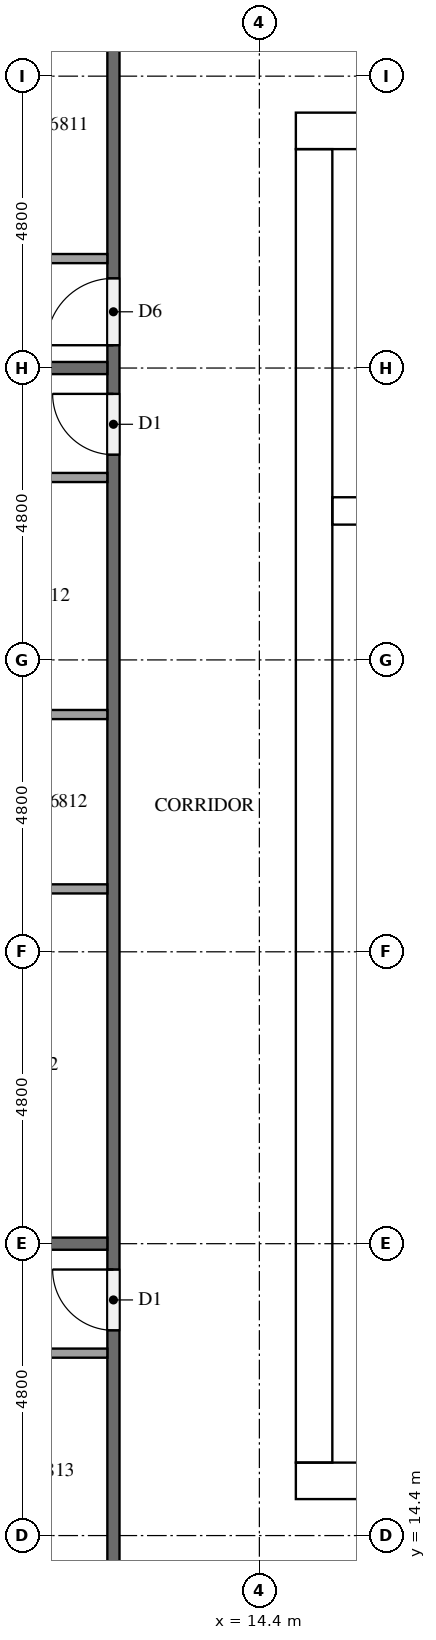
"""IFC4 building model, lengths in metres.
Left out: names, types, materials, properties, quantities, classifications, styles, units other than length and angle.
Written with IfcOpenShell. Run it as: python <this file> out.ifc"""

import sys

from ifc_helpers import new_model, si_unit, direction, frame, frame_2d, origin, place, context, subcontext, project, spatial, rectangle, extrude, element, fill, save


model = new_model("IFC4")
c1 = context("Model", 3, precision=1e-05, world=origin(), true_north=direction((0.0, 1.0)))
c2 = subcontext(c1, "Body", "Model", "MODEL_VIEW")
j1 = project(units=[si_unit("LENGTHUNIT", "METRE"), si_unit("PLANEANGLEUNIT", "RADIAN")], contexts=[c1])
p1 = place(None, origin())
s1 = spatial("IfcSite", under=j1, at=p1, CompositionType="ELEMENT")
p2 = place(p1, origin())
s2 = spatial("IfcBuilding", under=s1, at=p2, CompositionType="ELEMENT")
p3 = place(p2, frame((0.0, 0.0, 259.7)))
s3 = spatial("IfcBuildingStorey", under=s2, at=p3, CompositionType="ELEMENT", Elevation=259.7)
p4 = place(p3, frame((15.0, 15.3, 0.0), z_axis=(0.0, 0.0, 1.0), x_axis=(1.0, 0.0, 0.0)))
e1 = element("IfcWall", 1, at=p4, inside=s3, PredefinedType="SHEAR", context=c2, shape_type="SweptSolid", body=[
    extrude(rectangle(XDim=32.4, YDim=0.6, at=frame_2d((16.2, 0.0))), origin(), (0.0, 0.0, 1.0), 3.1),
])
p5 = place(p4, frame((15.3, 0.0, 0.0)))
e2 = element("IfcOpeningElement", 2, at=p5, cuts=e1, PredefinedType="OPENING", context=c2, shape_type="SweptSolid", body=[
    extrude(rectangle(XDim=1.8, YDim=2.1, at=frame_2d((0.9, 1.05))), frame((0.0, 0.31, 0.0), z_axis=(0.0, -1.0, 0.0), x_axis=(1.0, 0.0, 0.0)), (0.0, 0.0, 1.0), 0.62),
])
p6 = place(p3, frame((15.0, 37.5, 0.0), z_axis=(0.0, 0.0, 1.0), x_axis=(1.0, 0.0, 0.0)))
e3 = element("IfcWall", 3, at=p6, inside=s3, PredefinedType="SHEAR", context=c2, shape_type="SweptSolid", body=[
    extrude(rectangle(XDim=32.4, YDim=0.6, at=frame_2d((16.2, 0.0))), origin(), (0.0, 0.0, 1.0), 3.1),
])
p7 = place(p6, frame((15.3, 0.0, 0.0)))
e4 = element("IfcOpeningElement", 4, at=p7, cuts=e3, PredefinedType="OPENING", context=c2, shape_type="SweptSolid", body=[
    extrude(rectangle(XDim=1.8, YDim=2.1, at=frame_2d((0.9, 1.05))), frame((0.0, 0.31, 0.0), z_axis=(0.0, -1.0, 0.0), x_axis=(1.0, 0.0, 0.0)), (0.0, 0.0, 1.0), 0.62),
])
p8 = place(p6, frame((1.25, 0.0, 0.0)))
e5 = element("IfcOpeningElement", 5, at=p8, cuts=e3, PredefinedType="OPENING", context=c2, shape_type="SweptSolid", body=[
    extrude(rectangle(XDim=1.0, YDim=2.1, at=frame_2d((0.5, 1.05))), frame((0.0, 0.31, 0.0), z_axis=(0.0, -1.0, 0.0), x_axis=(1.0, 0.0, 0.0)), (0.0, 0.0, 1.0), 0.62),
])
p9 = place(p6, frame((4.988, 0.0, 0.0)))
e6 = element("IfcOpeningElement", 6, at=p9, cuts=e3, PredefinedType="OPENING", context=c2, shape_type="SweptSolid", body=[
    extrude(rectangle(XDim=1.0, YDim=2.1, at=frame_2d((0.5, 1.05))), frame((0.0, 0.31, 0.0), z_axis=(0.0, -1.0, 0.0), x_axis=(1.0, 0.0, 0.0)), (0.0, 0.0, 1.0), 0.62),
])
p10 = place(p3, frame((15.3, 15.6, 0.0), z_axis=(0.0, 0.0, 1.0), x_axis=(0.0, 1.0, 0.0)))
e7 = element("IfcWall", 7, at=p10, inside=s3, PredefinedType="SHEAR", context=c2, shape_type="SweptSolid", body=[
    extrude(rectangle(XDim=21.6, YDim=0.6, at=frame_2d((10.8, 0.0))), origin(), (0.0, 0.0, 1.0), 3.1),
])
p11 = place(p10, frame((5.16, 0.0, 0.0)))
e8 = element("IfcOpeningElement", 8, at=p11, cuts=e7, PredefinedType="OPENING", context=c2, shape_type="SweptSolid", body=[
    extrude(rectangle(XDim=1.2, YDim=2.1, at=frame_2d((0.6, 1.05))), frame((0.0, 0.31, 0.0), z_axis=(0.0, -1.0, 0.0), x_axis=(1.0, 0.0, 0.0)), (0.0, 0.0, 1.0), 0.62),
])
p12 = place(p3, frame((15.6, 31.25, 0.0), z_axis=(0.0, 0.0, 1.0), x_axis=(1.0, 0.0, 0.0)))
e9 = element("IfcWall", 9, at=p12, inside=s3, PredefinedType="SHEAR", context=c2, shape_type="SweptSolid", body=[
    extrude(rectangle(XDim=7.275, YDim=0.45, at=frame_2d((3.637, 0.0))), origin(), (0.0, 0.0, 1.0), 3.1),
])
p13 = place(p3, frame((12.0, 12.1, 0.0), z_axis=(0.0, 0.0, 1.0), x_axis=(0.0, 1.0, 0.0)))
e10 = element("IfcWall", 10, at=p13, inside=s3, PredefinedType="PARTITIONING", context=c2, shape_type="SweptSolid", body=[
    extrude(rectangle(XDim=28.6, YDim=0.2, at=frame_2d((14.3, 0.0))), origin(), (0.0, 0.0, 1.0), 3.1),
])
p14 = place(p13, frame((21.875, 0.0, 0.0)))
e11 = element("IfcOpeningElement", 11, at=p14, cuts=e10, PredefinedType="OPENING", context=c2, shape_type="SweptSolid", body=[
    extrude(rectangle(XDim=1.1, YDim=2.1, at=frame_2d((0.55, 1.05))), frame((0.0, 0.11, 0.0), z_axis=(0.0, -1.0, 0.0), x_axis=(1.0, 0.0, 0.0)), (0.0, 0.0, 1.0), 0.22),
])
p15 = place(p13, frame((20.075, 0.0, 0.0)))
e12 = element("IfcOpeningElement", 12, at=p15, cuts=e10, PredefinedType="OPENING", context=c2, shape_type="SweptSolid", body=[
    extrude(rectangle(XDim=1.0, YDim=2.1, at=frame_2d((0.5, 1.05))), frame((0.0, 0.11, 0.0), z_axis=(0.0, -1.0, 0.0), x_axis=(1.0, 0.0, 0.0)), (0.0, 0.0, 1.0), 0.22),
])
p16 = place(p13, frame((5.675, 0.0, 0.0)))
e13 = element("IfcOpeningElement", 13, at=p16, cuts=e10, PredefinedType="OPENING", context=c2, shape_type="SweptSolid", body=[
    extrude(rectangle(XDim=1.0, YDim=2.1, at=frame_2d((0.5, 1.05))), frame((0.0, 0.11, 0.0), z_axis=(0.0, -1.0, 0.0), x_axis=(1.0, 0.0, 0.0)), (0.0, 0.0, 1.0), 0.22),
])
p17 = place(p3, frame((0.1, 33.6, 0.0), z_axis=(0.0, 0.0, 1.0), x_axis=(1.0, 0.0, 0.0)))
e14 = element("IfcWall", 14, at=p17, inside=s3, PredefinedType="PARTITIONING", context=c2, shape_type="SweptSolid", body=[
    extrude(rectangle(XDim=11.8, YDim=0.2, at=frame_2d((5.9, 0.0))), origin(), (0.0, 0.0, 1.0), 3.1),
])
p18 = place(p3, frame((0.275, 19.2, 0.0), z_axis=(0.0, 0.0, 1.0), x_axis=(1.0, 0.0, 0.0)))
e15 = element("IfcWall", 15, at=p18, inside=s3, PredefinedType="PARTITIONING", context=c2, shape_type="SweptSolid", body=[
    extrude(rectangle(XDim=11.625, YDim=0.2, at=frame_2d((5.812, 0.0))), origin(), (0.0, 0.0, 1.0), 3.1),
])
p19 = place(p3, frame((11.9, 35.4, 0.0), z_axis=(0.0, 0.0, 1.0), x_axis=(-1.0, 0.0, 0.0)))
e16 = element("IfcWall", 16, at=p19, inside=s3, PredefinedType="PARTITIONING", context=c2, shape_type="SweptSolid", body=[
    extrude(rectangle(XDim=3.275, YDim=0.15, at=frame_2d((1.637, 0.0))), origin(), (0.0, 0.0, 1.0), 3.1),
])
for number, where, z_axis, x_axis in (
    (17, (11.9, 27.902, 0.0), (0.0, 0.0, 1.0), (-1.0, 0.0, 0.0)),
    (18, (11.9, 25.035, 0.0), (0.0, 0.0, 1.0), (-1.0, 0.0, 0.0)),
):
    element("IfcWall", number, at=place(p3, frame(where, z_axis=z_axis, x_axis=x_axis)), inside=s3, PredefinedType="PARTITIONING", context=c2, shape_type="SweptSolid", body=[
        extrude(rectangle(XDim=3.725, YDim=0.15, at=frame_2d((1.862, 0.0))), origin(), (0.0, 0.0, 1.0), 3.1),
    ])
p20 = place(p3, frame((11.9, 31.8, 0.0), z_axis=(0.0, 0.0, 1.0), x_axis=(-1.0, 0.0, 0.0)))
e19 = element("IfcWall", 19, at=p20, inside=s3, PredefinedType="PARTITIONING", context=c2, shape_type="SweptSolid", body=[
    extrude(rectangle(XDim=3.875, YDim=0.15, at=frame_2d((1.938, 0.0))), origin(), (0.0, 0.0, 1.0), 3.1),
])
p21 = place(p3, frame((11.9, 17.4, 0.0), z_axis=(0.0, 0.0, 1.0), x_axis=(-1.0, 0.0, 0.0)))
e20 = element("IfcWall", 20, at=p21, inside=s3, PredefinedType="PARTITIONING", context=c2, shape_type="SweptSolid", body=[
    extrude(rectangle(XDim=3.725, YDim=0.15, at=frame_2d((1.862, 0.0))), origin(), (0.0, 0.0, 1.0), 3.1),
])
p22 = place(p11, frame((1.2, 0.0, 0.0), z_axis=(0.0, 0.0, 1.0), x_axis=(-1.0, 0.0, 0.0)))
e21 = element("IfcDoor", 21, at=p22, inside=s3, OperationType="SINGLE_SWING_LEFT", PredefinedType="DOOR", context=c2, shape_type="SweptSolid", body=[
    extrude(rectangle(XDim=1.2, YDim=2.1, at=frame_2d((0.6, 1.05))), frame((0.0, 0.025, 0.0), z_axis=(0.0, -1.0, 0.0), x_axis=(1.0, 0.0, 0.0)), (0.0, 0.0, 1.0), 0.05),
])
fill(e8, e21)
p23 = place(p14, origin())
e22 = element("IfcDoor", 22, at=p23, inside=s3, OperationType="SINGLE_SWING_LEFT", PredefinedType="DOOR", context=c2, shape_type="SweptSolid", body=[
    extrude(rectangle(XDim=1.1, YDim=2.1, at=frame_2d((0.55, 1.05))), frame((0.0, 0.025, 0.0), z_axis=(0.0, -1.0, 0.0), x_axis=(1.0, 0.0, 0.0)), (0.0, 0.0, 1.0), 0.05),
])
fill(e11, e22)
p24 = place(p15, origin())
e23 = element("IfcDoor", 23, at=p24, inside=s3, OperationType="SINGLE_SWING_RIGHT", PredefinedType="DOOR", context=c2, shape_type="SweptSolid", body=[
    extrude(rectangle(XDim=1.0, YDim=2.1, at=frame_2d((0.5, 1.05))), frame((0.0, 0.025, 0.0), z_axis=(0.0, -1.0, 0.0), x_axis=(1.0, 0.0, 0.0)), (0.0, 0.0, 1.0), 0.05),
])
fill(e12, e23)
p25 = place(p16, origin())
e24 = element("IfcDoor", 24, at=p25, inside=s3, OperationType="SINGLE_SWING_RIGHT", PredefinedType="DOOR", context=c2, shape_type="SweptSolid", body=[
    extrude(rectangle(XDim=1.0, YDim=2.1, at=frame_2d((0.5, 1.05))), frame((0.0, 0.025, 0.0), z_axis=(0.0, -1.0, 0.0), x_axis=(1.0, 0.0, 0.0)), (0.0, 0.0, 1.0), 0.05),
])
fill(e13, e24)
save(model, sys.argv[1])
